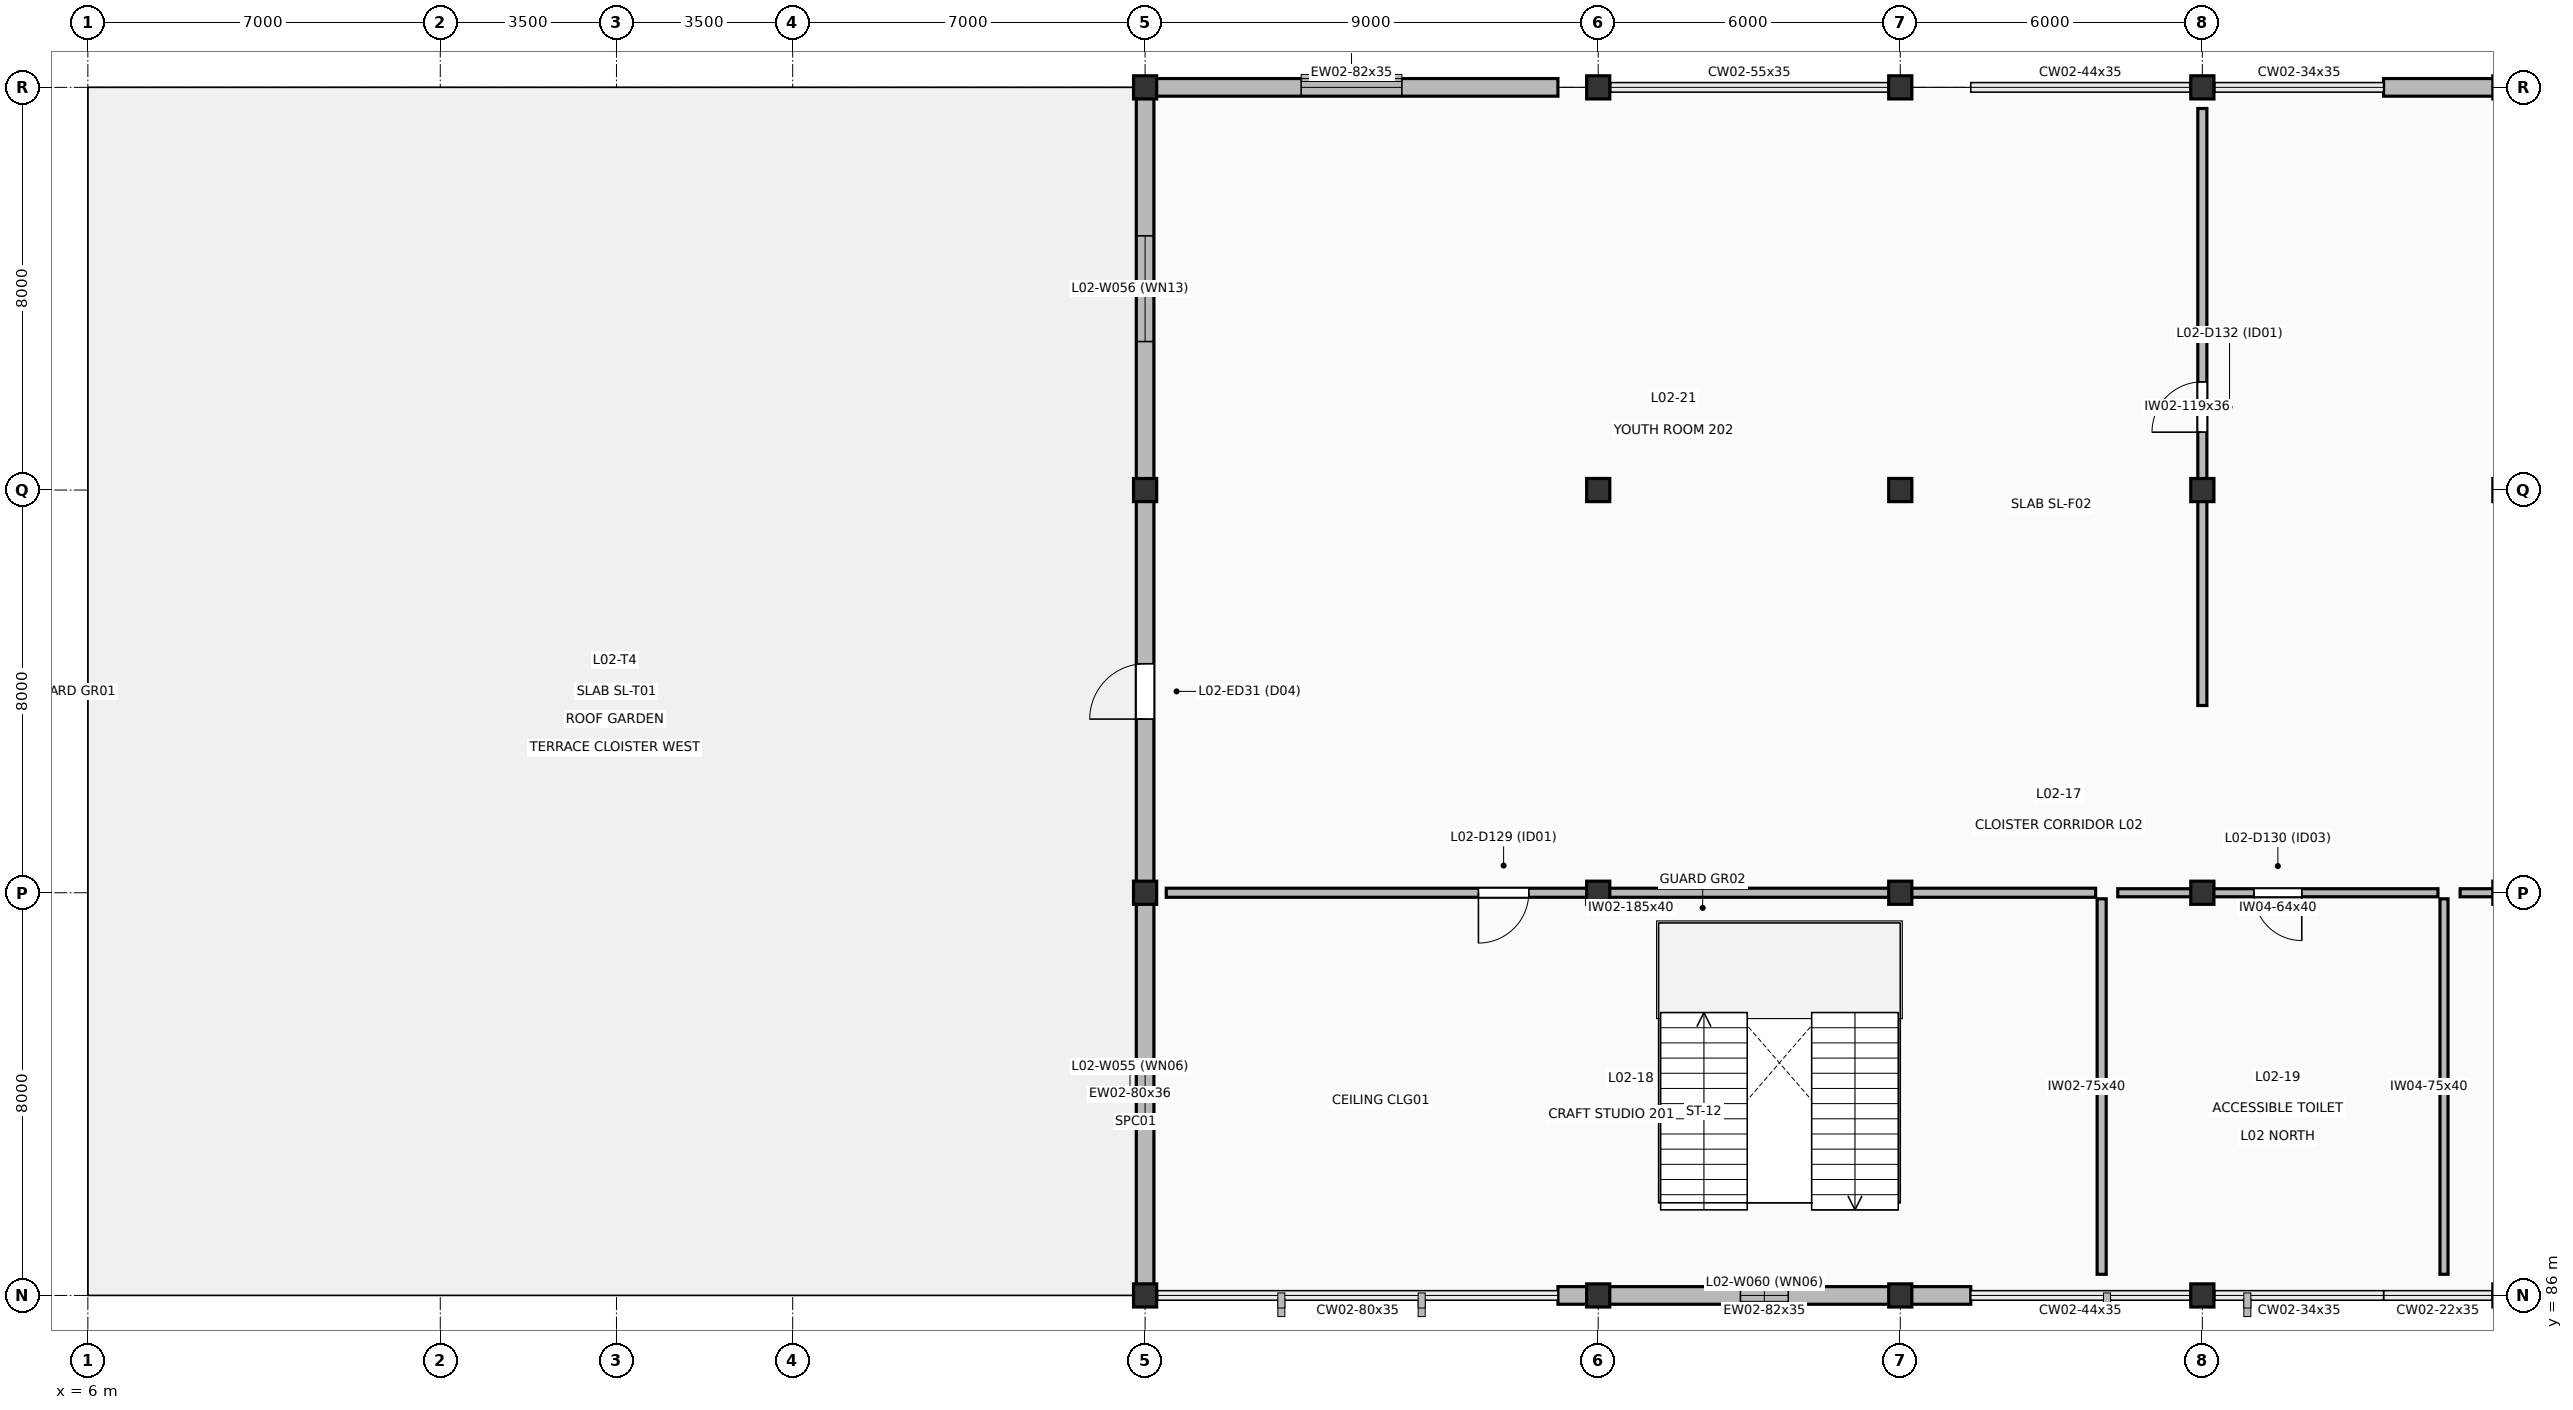
"""IFC4 building model, lengths in metres.
Left out: names, types, materials, properties, quantities, classifications, styles, units other than length and angle.
Written with IfcOpenShell. Run it as: python <this file> out.ifc"""

import sys

from ifc_helpers import new_model, si_unit, direction, frame, frame_2d, origin, origin_2d, place, context, subcontext, project, spatial, rectangle, extrude, element, fill, save


model = new_model("IFC4")
c1 = context("Model", 3, precision=1e-05, world=origin(), true_north=direction((0.0, 1.0)))
c2 = subcontext(c1, "Body", "Model", "MODEL_VIEW")
j1 = project(units=[si_unit("LENGTHUNIT", "METRE"), si_unit("PLANEANGLEUNIT", "RADIAN")], contexts=[c1])
p1 = place(None, origin())
s1 = spatial("IfcSite", under=j1, at=p1, CompositionType="ELEMENT")
p2 = place(p1, origin())
s2 = spatial("IfcBuilding", under=s1, at=p2, CompositionType="ELEMENT")
p3 = place(p2, frame((0.0, 0.0, 9.6)))
s3 = spatial("IfcBuildingStorey", under=s2, at=p3, CompositionType="ELEMENT", Elevation=9.6)
for number, where, z_axis, x_axis in (
    (1, (27.0, 86.0, 0.0), (0.0, 0.0, 1.0), (1.0, 0.0, 0.0)),
    (2, (27.0, 94.0, 0.0), (0.0, 0.0, 1.0), (1.0, 0.0, 0.0)),
    (3, (27.0, 102.0, 0.0), (0.0, 0.0, 1.0), (1.0, 0.0, 0.0)),
    (4, (27.0, 110.0, 0.0), (0.0, 0.0, 1.0), (1.0, 0.0, 0.0)),
    (5, (36.0, 86.0, 0.0), (0.0, 0.0, 1.0), (1.0, 0.0, 0.0)),
    (6, (36.0, 94.0, 0.0), (0.0, 0.0, 1.0), (1.0, 0.0, 0.0)),
    (7, (36.0, 102.0, 0.0), (0.0, 0.0, 1.0), (1.0, 0.0, 0.0)),
    (8, (36.0, 110.0, 0.0), (0.0, 0.0, 1.0), (1.0, 0.0, 0.0)),
    (9, (42.0, 86.0, 0.0), (0.0, 0.0, 1.0), (1.0, 0.0, 0.0)),
    (10, (42.0, 94.0, 0.0), (0.0, 0.0, 1.0), (1.0, 0.0, 0.0)),
    (11, (42.0, 102.0, 0.0), (0.0, 0.0, 1.0), (1.0, 0.0, 0.0)),
    (12, (42.0, 110.0, 0.0), (0.0, 0.0, 1.0), (1.0, 0.0, 0.0)),
    (13, (48.0, 86.0, 0.0), (0.0, 0.0, 1.0), (1.0, 0.0, 0.0)),
    (14, (48.0, 94.0, 0.0), (0.0, 0.0, 1.0), (1.0, 0.0, 0.0)),
    (15, (48.0, 102.0, 0.0), (0.0, 0.0, 1.0), (1.0, 0.0, 0.0)),
    (16, (48.0, 110.0, 0.0), (0.0, 0.0, 1.0), (1.0, 0.0, 0.0)),
    (17, (54.0, 86.0, 0.0), (0.0, 0.0, 1.0), (1.0, 0.0, 0.0)),
    (18, (54.0, 94.0, 0.0), (0.0, 0.0, 1.0), (1.0, 0.0, 0.0)),
    (19, (54.0, 102.0, 0.0), (0.0, 0.0, 1.0), (1.0, 0.0, 0.0)),
    (20, (54.0, 110.0, 0.0), (0.0, 0.0, 1.0), (1.0, 0.0, 0.0)),
):
    element("IfcColumn", number, at=place(p3, frame(where, z_axis=z_axis, x_axis=x_axis)), inside=s3, PredefinedType="COLUMN", context=c2, shape_type="SweptSolid", body=[
        extrude(rectangle(XDim=0.46, YDim=0.46, at=origin_2d()), origin(), (0.0, 0.0, 1.0), 4.2),
    ])
p4 = place(p3, frame((27.0, 86.0, 0.0), z_axis=(0.0, 0.0, 1.0), x_axis=(0.0, 1.0, 0.0)))
e21 = element("IfcWall", 21, at=p4, inside=s3, PredefinedType="SOLIDWALL", context=c2, shape_type="SweptSolid", body=[
    extrude(rectangle(XDim=8.0, YDim=0.35, at=frame_2d((4.0, 0.0))), origin(), (0.0, 0.0, 1.0), 3.58),
])
p5 = place(p4, frame((3.525, 0.0, 1.0)))
e22 = element("IfcOpeningElement", 22, at=p5, cuts=e21, PredefinedType="OPENING", context=c2, shape_type="SweptSolid", body=[
    extrude(rectangle(XDim=0.95, YDim=1.8, at=frame_2d((0.475, 0.9))), frame((0.0, 0.185, 0.0), z_axis=(0.0, -1.0, 0.0), x_axis=(1.0, 0.0, 0.0)), (0.0, 0.0, 1.0), 0.37),
])
p6 = place(p3, frame((27.0, 94.0, 0.0), z_axis=(0.0, 0.0, 1.0), x_axis=(0.0, 1.0, 0.0)))
e23 = element("IfcWall", 23, at=p6, inside=s3, PredefinedType="SOLIDWALL", context=c2, shape_type="SweptSolid", body=[
    extrude(rectangle(XDim=8.0, YDim=0.35, at=frame_2d((4.0, 0.0))), origin(), (0.0, 0.0, 1.0), 3.58),
])
p7 = place(p6, frame((3.45, 0.0, 0.0)))
e24 = element("IfcOpeningElement", 24, at=p7, cuts=e23, PredefinedType="OPENING", context=c2, shape_type="SweptSolid", body=[
    extrude(rectangle(XDim=1.1, YDim=2.2, at=frame_2d((0.55, 1.1))), frame((0.0, 0.185, 0.0), z_axis=(0.0, -1.0, 0.0), x_axis=(1.0, 0.0, 0.0)), (0.0, 0.0, 1.0), 0.37),
])
p8 = place(p3, frame((27.0, 102.0, 0.0), z_axis=(0.0, 0.0, 1.0), x_axis=(0.0, 1.0, 0.0)))
e25 = element("IfcWall", 25, at=p8, inside=s3, PredefinedType="SOLIDWALL", context=c2, shape_type="SweptSolid", body=[
    extrude(rectangle(XDim=8.0, YDim=0.35, at=frame_2d((4.0, 0.0))), origin(), (0.0, 0.0, 1.0), 3.58),
])
p9 = place(p8, frame((2.95, 0.0, 0.85)))
e26 = element("IfcOpeningElement", 26, at=p9, cuts=e25, PredefinedType="OPENING", context=c2, shape_type="SweptSolid", body=[
    extrude(rectangle(XDim=2.1, YDim=2.3, at=frame_2d((1.05, 1.15))), frame((0.0, 0.185, 0.0), z_axis=(0.0, -1.0, 0.0), x_axis=(1.0, 0.0, 0.0)), (0.0, 0.0, 1.0), 0.37),
])
p10 = place(p3, frame((27.0, 110.0, 0.0), z_axis=(0.0, 0.0, 1.0), x_axis=(1.0, 0.0, 0.0)))
e27 = element("IfcWall", 27, at=p10, inside=s3, PredefinedType="SOLIDWALL", context=c2, shape_type="SweptSolid", body=[
    extrude(rectangle(XDim=8.2, YDim=0.35, at=frame_2d((4.1, 0.0))), origin(), (0.0, 0.0, 1.0), 3.465),
])
p11 = place(p10, frame((3.1, 0.0, 0.9)))
e28 = element("IfcOpeningElement", 28, at=p11, cuts=e27, PredefinedType="OPENING", context=c2, shape_type="SweptSolid", body=[
    extrude(rectangle(XDim=2.0, YDim=2.2, at=frame_2d((1.0, 1.1))), frame((0.0, 0.185, 0.0), z_axis=(0.0, -1.0, 0.0), x_axis=(1.0, 0.0, 0.0)), (0.0, 0.0, 1.0), 0.37),
])
p12 = place(p3, frame((51.6, 110.0, 0.0), z_axis=(0.0, 0.0, 1.0), x_axis=(1.0, 0.0, 0.0)))
e29 = element("IfcWall", 29, at=p12, inside=s3, PredefinedType="SOLIDWALL", context=c2, shape_type="SweptSolid", body=[
    extrude(rectangle(XDim=8.4, YDim=0.35, at=frame_2d((4.2, 0.0))), origin(), (0.0, 0.0, 1.0), 3.465),
])
p13 = place(p12, frame((3.5, 0.0, 0.95)))
e30 = element("IfcOpeningElement", 30, at=p13, cuts=e29, PredefinedType="OPENING", context=c2, shape_type="SweptSolid", body=[
    extrude(rectangle(XDim=1.4, YDim=1.8, at=frame_2d((0.7, 0.9))), frame((0.0, 0.185, 0.0), z_axis=(0.0, -1.0, 0.0), x_axis=(1.0, 0.0, 0.0)), (0.0, 0.0, 1.0), 0.37),
])
p14 = place(p3, frame((43.4, 86.0, 0.0), z_axis=(0.0, 0.0, 1.0), x_axis=(-1.0, 0.0, 0.0)))
e31 = element("IfcWall", 31, at=p14, inside=s3, PredefinedType="SOLIDWALL", context=c2, shape_type="SweptSolid", body=[
    extrude(rectangle(XDim=8.2, YDim=0.35, at=frame_2d((4.1, 0.0))), origin(), (0.0, 0.0, 1.0), 3.465),
])
p15 = place(p14, frame((3.625, 0.0, 1.0)))
e32 = element("IfcOpeningElement", 32, at=p15, cuts=e31, PredefinedType="OPENING", context=c2, shape_type="SweptSolid", body=[
    extrude(rectangle(XDim=0.95, YDim=1.8, at=frame_2d((0.475, 0.9))), frame((0.0, 0.185, 0.0), z_axis=(0.0, -1.0, 0.0), x_axis=(1.0, 0.0, 0.0)), (0.0, 0.0, 1.0), 0.37),
])
p16 = place(p3, frame((45.88, 94.0, 0.0), z_axis=(0.0, 0.0, 1.0), x_axis=(-1.0, 0.0, 0.0)))
e33 = element("IfcWall", 33, at=p16, inside=s3, PredefinedType="PARTITIONING", context=c2, shape_type="SweptSolid", body=[
    extrude(rectangle(XDim=18.46, YDim=0.18, at=frame_2d((9.23, 0.0))), origin(), (0.0, 0.0, 1.0), 3.98),
])
p17 = place(p16, frame((11.259, 0.0, 0.0)))
e34 = element("IfcOpeningElement", 34, at=p17, cuts=e33, PredefinedType="OPENING", context=c2, shape_type="SweptSolid", body=[
    extrude(rectangle(XDim=1.0, YDim=2.15, at=frame_2d((0.5, 1.075))), frame((0.0, 0.1, 0.0), z_axis=(0.0, -1.0, 0.0), x_axis=(1.0, 0.0, 0.0)), (0.0, 0.0, 1.0), 0.2),
])
p18 = place(p3, frame((46.0, 86.42, 0.0), z_axis=(0.0, 0.0, 1.0), x_axis=(0.0, 1.0, 0.0)))
e35 = element("IfcWall", 35, at=p18, inside=s3, PredefinedType="PARTITIONING", context=c2, shape_type="SweptSolid", body=[
    extrude(rectangle(XDim=7.46, YDim=0.18, at=frame_2d((3.73, 0.0))), origin(), (0.0, 0.0, 1.0), 3.98),
])
p19 = place(p3, frame((52.68, 94.0, 0.0), z_axis=(0.0, 0.0, 1.0), x_axis=(-1.0, 0.0, 0.0)))
e36 = element("IfcWall", 36, at=p19, inside=s3, PredefinedType="PLUMBINGWALL", context=c2, shape_type="SweptSolid", body=[
    extrude(rectangle(XDim=6.36, YDim=0.16, at=frame_2d((3.18, 0.0))), origin(), (0.0, 0.0, 1.0), 3.98),
])
p20 = place(p19, frame((2.705, 0.0, 0.0)))
e37 = element("IfcOpeningElement", 37, at=p20, cuts=e36, PredefinedType="OPENING", context=c2, shape_type="SweptSolid", body=[
    extrude(rectangle(XDim=0.95, YDim=2.15, at=frame_2d((0.475, 1.075))), frame((0.0, 0.09, 0.0), z_axis=(0.0, -1.0, 0.0), x_axis=(1.0, 0.0, 0.0)), (0.0, 0.0, 1.0), 0.18),
])
p21 = place(p3, frame((52.8, 86.42, 0.0), z_axis=(0.0, 0.0, 1.0), x_axis=(0.0, 1.0, 0.0)))
e38 = element("IfcWall", 38, at=p21, inside=s3, PredefinedType="PLUMBINGWALL", context=c2, shape_type="SweptSolid", body=[
    extrude(rectangle(XDim=7.46, YDim=0.16, at=frame_2d((3.73, 0.0))), origin(), (0.0, 0.0, 1.0), 3.98),
])
p22 = place(p3, frame((59.68, 94.0, 0.0), z_axis=(0.0, 0.0, 1.0), x_axis=(-1.0, 0.0, 0.0)))
e39 = element("IfcWall", 39, at=p22, inside=s3, PredefinedType="PLUMBINGWALL", context=c2, shape_type="SweptSolid", body=[
    extrude(rectangle(XDim=6.56, YDim=0.16, at=frame_2d((3.28, 0.0))), origin(), (0.0, 0.0, 1.0), 3.98),
])
p23 = place(p22, frame((2.805, 0.0, 0.0)))
e40 = element("IfcOpeningElement", 40, at=p23, cuts=e39, PredefinedType="OPENING", context=c2, shape_type="SweptSolid", body=[
    extrude(rectangle(XDim=0.95, YDim=2.15, at=frame_2d((0.475, 1.075))), frame((0.0, 0.09, 0.0), z_axis=(0.0, -1.0, 0.0), x_axis=(1.0, 0.0, 0.0)), (0.0, 0.0, 1.0), 0.18),
])
p24 = place(p3, frame((48.0, 97.72, 0.0), z_axis=(0.0, 0.0, 1.0), x_axis=(0.0, 1.0, 0.0)))
e41 = element("IfcWall", 41, at=p24, inside=s3, PredefinedType="PARTITIONING", context=c2, shape_type="SweptSolid", body=[
    extrude(rectangle(XDim=11.86, YDim=0.18, at=frame_2d((5.93, 0.0))), origin(), (0.0, 0.0, 1.0), 3.58),
])
p25 = place(p24, frame((5.43, 0.0, 0.0)))
e42 = element("IfcOpeningElement", 42, at=p25, cuts=e41, PredefinedType="OPENING", context=c2, shape_type="SweptSolid", body=[
    extrude(rectangle(XDim=1.0, YDim=2.15, at=frame_2d((0.5, 1.075))), frame((0.0, 0.1, 0.0), z_axis=(0.0, -1.0, 0.0), x_axis=(1.0, 0.0, 0.0)), (0.0, 0.0, 1.0), 0.2),
])
p26 = place(p5, origin())
e43 = element("IfcWindow", 43, at=p26, inside=s3, PartitioningType="SINGLE_PANEL", PredefinedType="WINDOW", context=c2, shape_type="SweptSolid", body=[
    extrude(rectangle(XDim=0.95, YDim=1.8, at=frame_2d((0.475, 0.9))), frame((0.0, 0.03, 0.0), z_axis=(0.0, -1.0, 0.0), x_axis=(1.0, 0.0, 0.0)), (0.0, 0.0, 1.0), 0.06),
])
fill(e22, e43)
p27 = place(p7, origin())
e44 = element("IfcDoor", 44, at=p27, inside=s3, OperationType="SINGLE_SWING_LEFT", PredefinedType="DOOR", context=c2, shape_type="SweptSolid", body=[
    extrude(rectangle(XDim=1.1, YDim=2.2, at=frame_2d((0.55, 1.1))), frame((0.0, 0.025, 0.0), z_axis=(0.0, -1.0, 0.0), x_axis=(1.0, 0.0, 0.0)), (0.0, 0.0, 1.0), 0.05),
])
fill(e24, e44)
p28 = place(p9, origin())
e45 = element("IfcWindow", 45, at=p28, inside=s3, PartitioningType="DOUBLE_PANEL_VERTICAL", PredefinedType="WINDOW", context=c2, shape_type="SweptSolid", body=[
    extrude(rectangle(XDim=2.1, YDim=2.3, at=frame_2d((1.05, 1.15))), frame((0.0, 0.03, 0.0), z_axis=(0.0, -1.0, 0.0), x_axis=(1.0, 0.0, 0.0)), (0.0, 0.0, 1.0), 0.06),
])
fill(e26, e45)
p29 = place(p11, origin())
e46 = element("IfcWindow", 46, at=p29, inside=s3, PartitioningType="DOUBLE_PANEL_VERTICAL", PredefinedType="WINDOW", context=c2, shape_type="SweptSolid", body=[
    extrude(rectangle(XDim=2.0, YDim=2.2, at=frame_2d((1.0, 1.1))), frame((0.0, 0.03, 0.0), z_axis=(0.0, -1.0, 0.0), x_axis=(1.0, 0.0, 0.0)), (0.0, 0.0, 1.0), 0.06),
])
fill(e28, e46)
p30 = place(p15, origin())
e47 = element("IfcWindow", 47, at=p30, inside=s3, PartitioningType="SINGLE_PANEL", PredefinedType="WINDOW", context=c2, shape_type="SweptSolid", body=[
    extrude(rectangle(XDim=0.95, YDim=1.8, at=frame_2d((0.475, 0.9))), frame((0.0, 0.03, 0.0), z_axis=(0.0, -1.0, 0.0), x_axis=(1.0, 0.0, 0.0)), (0.0, 0.0, 1.0), 0.06),
])
fill(e32, e47)
p31 = place(p17, origin())
e48 = element("IfcDoor", 48, at=p31, inside=s3, OperationType="SINGLE_SWING_RIGHT", PredefinedType="DOOR", context=c2, shape_type="SweptSolid", body=[
    extrude(rectangle(XDim=1.0, YDim=2.15, at=frame_2d((0.5, 1.075))), frame((0.0, 0.025, 0.0), z_axis=(0.0, -1.0, 0.0), x_axis=(1.0, 0.0, 0.0)), (0.0, 0.0, 1.0), 0.05),
])
fill(e34, e48)
p32 = place(p20, origin())
e49 = element("IfcDoor", 49, at=p32, inside=s3, OperationType="SINGLE_SWING_LEFT", PredefinedType="DOOR", context=c2, shape_type="SweptSolid", body=[
    extrude(rectangle(XDim=0.95, YDim=2.15, at=frame_2d((0.475, 1.075))), frame((0.0, 0.025, 0.0), z_axis=(0.0, -1.0, 0.0), x_axis=(1.0, 0.0, 0.0)), (0.0, 0.0, 1.0), 0.05),
])
fill(e37, e49)
p33 = place(p25, origin())
e50 = element("IfcDoor", 50, at=p33, inside=s3, OperationType="SINGLE_SWING_LEFT", PredefinedType="DOOR", context=c2, shape_type="SweptSolid", body=[
    extrude(rectangle(XDim=1.0, YDim=2.15, at=frame_2d((0.5, 1.075))), frame((0.0, 0.025, 0.0), z_axis=(0.0, -1.0, 0.0), x_axis=(1.0, 0.0, 0.0)), (0.0, 0.0, 1.0), 0.05),
])
fill(e42, e50)
save(model, sys.argv[1])
